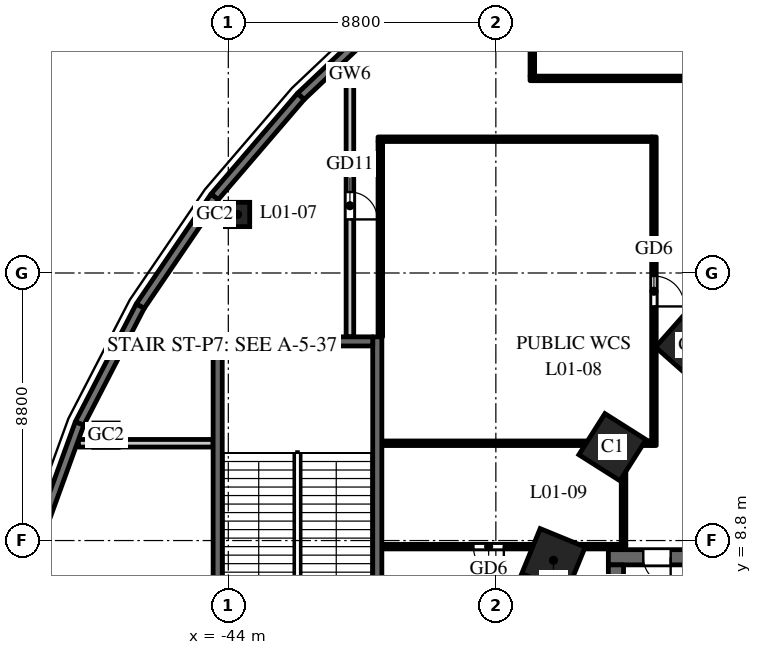
"""IFC4 building model, lengths in metres.
Left out: names, types, materials, properties, quantities, classifications, styles, units other than length and angle.
Written with IfcOpenShell. Run it as: python <this file> out.ifc"""

import sys

from ifc_helpers import new_model, si_unit, direction, frame, frame_2d, origin, origin_2d, place, context, subcontext, project, spatial, rectangle, hollow_rectangle, extrude, element, fill, save


model = new_model("IFC4")
c1 = context("Model", 3, precision=1e-05, world=origin(), true_north=direction((0.0, 1.0)))
c2 = subcontext(c1, "Body", "Model", "MODEL_VIEW")
j1 = project(units=[si_unit("LENGTHUNIT", "METRE"), si_unit("PLANEANGLEUNIT", "RADIAN")], contexts=[c1])
p1 = place(None, origin())
s1 = spatial("IfcSite", under=j1, at=p1, CompositionType="ELEMENT")
p2 = place(p1, origin())
s2 = spatial("IfcBuilding", under=s1, at=p2, CompositionType="ELEMENT")
p3 = place(p2, frame((0.0, 0.0, 7.5)))
s3 = spatial("IfcBuildingStorey", under=s2, at=p3, CompositionType="ELEMENT", Elevation=7.5)
for number, where, z_axis, x_axis in (
    (1, (-28.819, 15.23, 0.0), (0.0, 0.0, 1.0), (-0.663, -0.749, 0.0)),
    (2, (-31.365, 11.871, 0.0), (0.0, 0.0, 1.0), (-0.535, -0.845, 0.0)),
    (3, (-33.305, 8.149, 0.0), (0.0, 0.0, 1.0), (-0.379, -0.925, 0.0)),
):
    element("IfcColumn", number, at=place(p3, frame(where, z_axis=z_axis, x_axis=x_axis)), inside=s3, PredefinedType="COLUMN", context=c2, shape_type="SweptSolid", body=[
        extrude(rectangle(XDim=1.6, YDim=1.6, at=origin_2d()), origin(), (0.0, 0.0, 1.0), 6.0),
    ])
p4 = place(p3, frame((-16.5, 8.25, 0.0), z_axis=(0.0, 0.0, 1.0), x_axis=(-1.0, 0.0, 0.0)))
e4 = element("IfcWall", 4, at=p4, inside=s3, PredefinedType="SHEAR", context=c2, shape_type="SweptSolid", body=[
    extrude(rectangle(XDim=15.0, YDim=0.5, at=frame_2d((7.5, 0.0))), origin(), (0.0, 0.0, 1.0), 5.75),
])
p5 = place(p4, frame((6.9, 0.0, 0.0)))
e5 = element("IfcOpeningElement", 5, at=p5, cuts=e4, PredefinedType="OPENING", context=c2, shape_type="SweptSolid", body=[
    extrude(rectangle(XDim=1.2, YDim=2.1, at=frame_2d((0.6, 1.05))), frame((0.0, 0.26, 0.0), z_axis=(0.0, -1.0, 0.0), x_axis=(1.0, 0.0, 0.0)), (0.0, 0.0, 1.0), 0.52),
])
p6 = place(p4, frame((12.95, 0.0, 0.0)))
e6 = element("IfcOpeningElement", 6, at=p6, cuts=e4, PredefinedType="OPENING", context=c2, shape_type="SweptSolid", body=[
    extrude(rectangle(XDim=0.9, YDim=2.1, at=frame_2d((0.45, 1.05))), frame((0.0, 0.26, 0.0), z_axis=(0.0, -1.0, 0.0), x_axis=(1.0, 0.0, 0.0)), (0.0, 0.0, 1.0), 0.52),
])
p7 = place(p3, frame((-31.25, -8.0, 0.0), z_axis=(0.0, 0.0, 1.0), x_axis=(0.0, 1.0, 0.0)))
e7 = element("IfcWall", 7, at=p7, inside=s3, PredefinedType="SHEAR", context=c2, shape_type="SweptSolid", body=[
    extrude(rectangle(XDim=16.0, YDim=0.5, at=frame_2d((8.0, 0.0))), origin(), (0.0, 0.0, 1.0), 5.75),
])
for number, where, z_axis, x_axis in (
    (8, (-43.696, 19.525, 0.0), (0.0, 0.0, 1.0), (1.0, 0.0, 0.0)),
    (9, (-48.022, 12.267, 0.0), (0.0, 0.0, 1.0), (1.0, 0.0, 0.0)),
):
    element("IfcColumn", number, at=place(p3, frame(where, z_axis=z_axis, x_axis=x_axis)), inside=s3, PredefinedType="COLUMN", context=c2, shape_type="SweptSolid", body=[
        extrude(hollow_rectangle(XDim=0.8, YDim=0.8, WallThickness=0.04, at=origin_2d()), origin(), (0.0, 0.0, 1.0), 6.0),
    ])
p8 = place(p3, frame((-34.0, 24.075, 0.0), z_axis=(0.0, 0.0, 1.0), x_axis=(0.0, 1.0, 0.0)))
e10 = element("IfcWall", 10, at=p8, inside=s3, PredefinedType="PARTITIONING", context=c2, shape_type="SweptSolid", body=[
    extrude(rectangle(XDim=5.445, YDim=0.15, at=frame_2d((2.722, 0.0))), origin(), (0.0, 0.0, 1.0), 5.15),
])
p9 = place(p3, frame((8.075, 24.0, 0.0), z_axis=(0.0, 0.0, 1.0), x_axis=(-1.0, 0.0, 0.0)))
e11 = element("IfcWall", 11, at=p9, inside=s3, PredefinedType="PARTITIONING", context=c2, shape_type="SweptSolid", body=[
    extrude(rectangle(XDim=42.15, YDim=0.15, at=frame_2d((21.075, 0.0))), origin(), (0.0, 0.0, 1.0), 4.75),
])
p10 = place(p9, frame((19.875, 0.0, 0.0)))
e12 = element("IfcOpeningElement", 12, at=p10, cuts=e11, PredefinedType="OPENING", context=c2, shape_type="SweptSolid", body=[
    extrude(rectangle(XDim=1.4, YDim=2.1, at=frame_2d((0.7, 1.05))), frame((0.0, 0.085, 0.0), z_axis=(0.0, -1.0, 0.0), x_axis=(1.0, 0.0, 0.0)), (0.0, 0.0, 1.0), 0.17),
])
p11 = place(p3, frame((-44.5, 12.0, 0.0), z_axis=(0.0, 0.0, 1.0), x_axis=(-1.0, 0.0, 0.0)))
e13 = element("IfcWall", 13, at=p11, inside=s3, PredefinedType="PARTITIONING", context=c2, shape_type="SweptSolid", body=[
    extrude(rectangle(XDim=4.43, YDim=0.25, at=frame_2d((2.215, 0.0))), origin(), (0.0, 0.0, 1.0), 5.15),
])
p12 = place(p3, frame((-40.646, 24.0, 0.0), z_axis=(0.0, 0.0, 1.0), x_axis=(1.0, 0.0, 0.0)))
e14 = element("IfcWall", 14, at=p12, inside=s3, PredefinedType="PARTITIONING", context=c2, shape_type="SweptSolid", body=[
    extrude(rectangle(XDim=0.521, YDim=0.25, at=frame_2d((0.26, 0.0))), origin(), (0.0, 0.0, 1.0), 5.75),
])
p13 = place(p3, frame((-40.0, 24.125, 0.0), z_axis=(0.0, 0.0, 1.0), x_axis=(0.0, -1.0, 0.0)))
e15 = element("IfcWall", 15, at=p13, inside=s3, PredefinedType="PARTITIONING", context=c2, shape_type="SweptSolid", body=[
    extrude(rectangle(XDim=8.625, YDim=0.25, at=frame_2d((4.312, 0.0))), origin(), (0.0, 0.0, 1.0), 4.75),
])
p14 = place(p13, frame((3.863, 0.0, 0.0)))
e16 = element("IfcOpeningElement", 16, at=p14, cuts=e15, PredefinedType="OPENING", context=c2, shape_type="SweptSolid", body=[
    extrude(rectangle(XDim=0.9, YDim=2.1, at=frame_2d((0.45, 1.05))), frame((0.0, 0.135, 0.0), z_axis=(0.0, -1.0, 0.0), x_axis=(1.0, 0.0, 0.0)), (0.0, 0.0, 1.0), 0.27),
])
p15 = place(p3, frame((-31.065, 12.0, 0.0), z_axis=(0.0, 0.0, 1.0), x_axis=(-1.0, 0.0, 0.0)))
e17 = element("IfcWall", 17, at=p15, inside=s3, PredefinedType="PARTITIONING", context=c2, shape_type="SweptSolid", body=[
    extrude(rectangle(XDim=7.885, YDim=0.15, at=frame_2d((3.942, 0.0))), origin(), (0.0, 0.0, 1.0), 5.75),
])
p16 = place(p3, frame((-30.0, 22.075, 0.0), z_axis=(0.0, 0.0, 1.0), x_axis=(0.0, -1.0, 0.0)))
e18 = element("IfcWall", 18, at=p16, inside=s3, PredefinedType="PARTITIONING", context=c2, shape_type="SweptSolid", body=[
    extrude(rectangle(XDim=10.15, YDim=0.15, at=frame_2d((5.075, 0.0))), origin(), (0.0, 0.0, 1.0), 4.75),
])
p17 = place(p16, frame((4.575, 0.0, 0.0)))
e19 = element("IfcOpeningElement", 19, at=p17, cuts=e18, PredefinedType="OPENING", context=c2, shape_type="SweptSolid", body=[
    extrude(rectangle(XDim=1.0, YDim=2.1, at=frame_2d((0.5, 1.05))), frame((0.0, 0.085, 0.0), z_axis=(0.0, -1.0, 0.0), x_axis=(1.0, 0.0, 0.0)), (0.0, 0.0, 1.0), 0.17),
])
p18 = place(p3, frame((-30.075, 12.0, 0.0), z_axis=(0.0, 0.0, 1.0), x_axis=(-1.0, 0.0, 0.0)))
e20 = element("IfcWall", 20, at=p18, inside=s3, PredefinedType="PARTITIONING", context=c2, shape_type="SweptSolid", body=[
    extrude(rectangle(XDim=0.86, YDim=0.15, at=frame_2d((0.43, 0.0))), origin(), (0.0, 0.0, 1.0), 5.75),
])
p19 = place(p3, frame((-39.0, 15.5, 0.0), z_axis=(0.0, 0.0, 1.0), x_axis=(0.0, 1.0, 0.0)))
e21 = element("IfcWall", 21, at=p19, inside=s3, PredefinedType="PARTITIONING", context=c2, shape_type="SweptSolid", body=[
    extrude(rectangle(XDim=6.425, YDim=0.15, at=frame_2d((3.212, 0.0))), origin(), (0.0, 0.0, 1.0), 4.75),
])
p20 = place(p3, frame((-39.075, 22.0, 0.0), z_axis=(0.0, 0.0, 1.0), x_axis=(1.0, 0.0, 0.0)))
e22 = element("IfcWall", 22, at=p20, inside=s3, PredefinedType="PARTITIONING", context=c2, shape_type="SweptSolid", body=[
    extrude(rectangle(XDim=9.0, YDim=0.15, at=frame_2d((4.5, 0.0))), origin(), (0.0, 0.0, 1.0), 4.75),
])
p21 = place(p3, frame((-30.925, 8.6, 0.0), z_axis=(0.0, 0.0, 1.0), x_axis=(-1.0, 0.0, 0.0)))
e23 = element("IfcWall", 23, at=p21, inside=s3, PredefinedType="PARTITIONING", context=c2, shape_type="SweptSolid", body=[
    extrude(rectangle(XDim=8.025, YDim=0.15, at=frame_2d((4.012, 0.0))), origin(), (0.0, 0.0, 1.0), 4.85),
])
p22 = place(p21, frame((4.012, 0.0, 0.0)))
e24 = element("IfcOpeningElement", 24, at=p22, cuts=e23, PredefinedType="OPENING", context=c2, shape_type="SweptSolid", body=[
    extrude(rectangle(XDim=1.0, YDim=2.1, at=frame_2d((0.5, 1.05))), frame((0.0, 0.085, 0.0), z_axis=(0.0, -1.0, 0.0), x_axis=(1.0, 0.0, 0.0)), (0.0, 0.0, 1.0), 0.17),
])
p23 = place(p3, frame((-31.0, 11.925, 0.0), z_axis=(0.0, 0.0, 1.0), x_axis=(0.0, -1.0, 0.0)))
e25 = element("IfcWall", 25, at=p23, inside=s3, PredefinedType="PARTITIONING", context=c2, shape_type="SweptSolid", body=[
    extrude(rectangle(XDim=3.25, YDim=0.15, at=frame_2d((1.625, 0.0))), origin(), (0.0, 0.0, 1.0), 5.75),
])
p24 = place(p3, frame((-38.453, 26.401, 0.0), z_axis=(0.0, 0.0, 1.0), x_axis=(-0.72620446032, -0.687478786444, 0.0)))
e26 = element("IfcWall", 26, at=p24, inside=s3, PredefinedType="SOLIDWALL", context=c2, shape_type="SweptSolid", body=[
    extrude(rectangle(XDim=4.356, YDim=0.3, at=frame_2d((2.178, 0.0))), origin(), (0.0, 0.0, 1.0), 5.75),
])
p25 = place(p24, frame((0.608, 0.0, 1.0)))
e27 = element("IfcOpeningElement", 27, at=p25, cuts=e26, PredefinedType="OPENING", context=c2, shape_type="SweptSolid", body=[
    extrude(rectangle(XDim=2.4, YDim=3.0, at=frame_2d((1.2, 1.5))), frame((0.0, 0.16, 0.0), z_axis=(0.0, -1.0, 0.0), x_axis=(1.0, 0.0, 0.0)), (0.0, 0.0, 1.0), 0.32),
])
p26 = place(p3, frame((-41.617, 23.406, 0.0), z_axis=(0.0, 0.0, 1.0), x_axis=(-0.651387059497, -0.758745608699, 0.0)))
e28 = element("IfcWall", 28, at=p26, inside=s3, PredefinedType="SOLIDWALL", context=c2, shape_type="SweptSolid", body=[
    extrude(rectangle(XDim=4.353, YDim=0.3, at=frame_2d((2.176, 0.0))), origin(), (0.0, 0.0, 1.0), 5.75),
])
p27 = place(p26, frame((0.976, 0.0, 1.0)))
e29 = element("IfcOpeningElement", 29, at=p27, cuts=e28, PredefinedType="OPENING", context=c2, shape_type="SweptSolid", body=[
    extrude(rectangle(XDim=2.4, YDim=3.0, at=frame_2d((1.2, 1.5))), frame((0.0, 0.16, 0.0), z_axis=(0.0, -1.0, 0.0), x_axis=(1.0, 0.0, 0.0)), (0.0, 0.0, 1.0), 0.32),
])
p28 = place(p3, frame((-44.452, 20.104, 0.0), z_axis=(0.0, 0.0, 1.0), x_axis=(-0.562667738859, -0.82668314102, 0.0)))
e30 = element("IfcWall", 30, at=p28, inside=s3, PredefinedType="SOLIDWALL", context=c2, shape_type="SweptSolid", body=[
    extrude(rectangle(XDim=4.349, YDim=0.3, at=frame_2d((2.174, 0.0))), origin(), (0.0, 0.0, 1.0), 5.75),
])
p29 = place(p28, frame((0.974, 0.0, 1.0)))
e31 = element("IfcOpeningElement", 31, at=p29, cuts=e30, PredefinedType="OPENING", context=c2, shape_type="SweptSolid", body=[
    extrude(rectangle(XDim=2.4, YDim=3.0, at=frame_2d((1.2, 1.5))), frame((0.0, 0.16, 0.0), z_axis=(0.0, -1.0, 0.0), x_axis=(1.0, 0.0, 0.0)), (0.0, 0.0, 1.0), 0.32),
])
p30 = place(p3, frame((-46.899, 16.508, 0.0), z_axis=(0.0, 0.0, 1.0), x_axis=(-0.459242531468, -0.888310923771, 0.0)))
e32 = element("IfcWall", 32, at=p30, inside=s3, PredefinedType="SOLIDWALL", context=c2, shape_type="SweptSolid", body=[
    extrude(rectangle(XDim=4.345, YDim=0.3, at=frame_2d((2.172, 0.0))), origin(), (0.0, 0.0, 1.0), 5.75),
])
p31 = place(p30, frame((0.972, 0.0, 1.0)))
e33 = element("IfcOpeningElement", 33, at=p31, cuts=e32, PredefinedType="OPENING", context=c2, shape_type="SweptSolid", body=[
    extrude(rectangle(XDim=2.4, YDim=3.0, at=frame_2d((1.2, 1.5))), frame((0.0, 0.16, 0.0), z_axis=(0.0, -1.0, 0.0), x_axis=(1.0, 0.0, 0.0)), (0.0, 0.0, 1.0), 0.32),
])
p32 = place(p3, frame((-48.894, 12.649, 0.0), z_axis=(0.0, 0.0, 1.0), x_axis=(-0.341286990045, -0.939959142956, 0.0)))
e34 = element("IfcWall", 34, at=p32, inside=s3, PredefinedType="SOLIDWALL", context=c2, shape_type="SweptSolid", body=[
    extrude(rectangle(XDim=4.342, YDim=0.3, at=frame_2d((2.171, 0.0))), origin(), (0.0, 0.0, 1.0), 5.75),
])
p33 = place(p32, frame((0.971, 0.0, 1.0)))
e35 = element("IfcOpeningElement", 35, at=p33, cuts=e34, PredefinedType="OPENING", context=c2, shape_type="SweptSolid", body=[
    extrude(rectangle(XDim=2.4, YDim=3.0, at=frame_2d((1.2, 1.5))), frame((0.0, 0.16, 0.0), z_axis=(0.0, -1.0, 0.0), x_axis=(1.0, 0.0, 0.0)), (0.0, 0.0, 1.0), 0.32),
])
for number, where, z_axis, x_axis in (
    (36, (-44.35, 4.5, 0.0), (0.0, 0.0, 1.0), (0.0, 1.0, 0.0)),
    (37, (-39.1, 4.5, 0.0), (0.0, 0.0, 1.0), (0.0, 1.0, 0.0)),
):
    element("IfcWall", number, at=place(p3, frame(where, z_axis=z_axis, x_axis=x_axis)), inside=s3, PredefinedType="SHEAR", context=c2, shape_type="SweptSolid", body=[
        extrude(rectangle(XDim=11.0, YDim=0.3, at=frame_2d((5.5, 0.0))), origin(), (0.0, 0.0, 1.0), 5.75),
    ])
p34 = place(p3, frame((-44.2, 15.35, 0.0), z_axis=(0.0, 0.0, 1.0), x_axis=(1.0, 0.0, 0.0)))
e38 = element("IfcWall", 38, at=p34, inside=s3, PredefinedType="SHEAR", context=c2, shape_type="SweptSolid", body=[
    extrude(rectangle(XDim=4.95, YDim=0.3, at=frame_2d((2.475, 0.0))), origin(), (0.0, 0.0, 1.0), 5.75),
])
p35 = place(p6, origin())
e39 = element("IfcDoor", 39, at=p35, inside=s3, OperationType="SINGLE_SWING_RIGHT", PredefinedType="DOOR", context=c2, shape_type="SweptSolid", body=[
    extrude(rectangle(XDim=0.9, YDim=2.1, at=frame_2d((0.45, 1.05))), frame((0.0, 0.025, 0.0), z_axis=(0.0, -1.0, 0.0), x_axis=(1.0, 0.0, 0.0)), (0.0, 0.0, 1.0), 0.05),
])
fill(e6, e39)
p36 = place(p14, origin())
e40 = element("IfcDoor", 40, at=p36, inside=s3, OperationType="SINGLE_SWING_RIGHT", PredefinedType="DOOR", context=c2, shape_type="SweptSolid", body=[
    extrude(rectangle(XDim=0.9, YDim=2.1, at=frame_2d((0.45, 1.05))), frame((0.0, 0.025, 0.0), z_axis=(0.0, -1.0, 0.0), x_axis=(1.0, 0.0, 0.0)), (0.0, 0.0, 1.0), 0.05),
])
fill(e16, e40)
p37 = place(p17, origin())
e41 = element("IfcDoor", 41, at=p37, inside=s3, OperationType="SINGLE_SWING_RIGHT", PredefinedType="DOOR", context=c2, shape_type="SweptSolid", body=[
    extrude(rectangle(XDim=1.0, YDim=2.1, at=frame_2d((0.5, 1.05))), frame((0.0, 0.025, 0.0), z_axis=(0.0, -1.0, 0.0), x_axis=(1.0, 0.0, 0.0)), (0.0, 0.0, 1.0), 0.05),
])
fill(e19, e41)
p38 = place(p22, origin())
e42 = element("IfcDoor", 42, at=p38, inside=s3, OperationType="SINGLE_SWING_LEFT", PredefinedType="DOOR", context=c2, shape_type="SweptSolid", body=[
    extrude(rectangle(XDim=1.0, YDim=2.1, at=frame_2d((0.5, 1.05))), frame((0.0, 0.025, 0.0), z_axis=(0.0, -1.0, 0.0), x_axis=(1.0, 0.0, 0.0)), (0.0, 0.0, 1.0), 0.05),
])
fill(e24, e42)
p39 = place(p25, origin())
e43 = element("IfcWindow", 43, at=p39, inside=s3, PartitioningType="SINGLE_PANEL", PredefinedType="WINDOW", context=c2, shape_type="SweptSolid", body=[
    extrude(rectangle(XDim=2.4, YDim=3.0, at=frame_2d((1.2, 1.5))), frame((0.0, 0.03, 0.0), z_axis=(0.0, -1.0, 0.0), x_axis=(1.0, 0.0, 0.0)), (0.0, 0.0, 1.0), 0.06),
])
fill(e27, e43)
p40 = place(p27, origin())
e44 = element("IfcWindow", 44, at=p40, inside=s3, PartitioningType="SINGLE_PANEL", PredefinedType="WINDOW", context=c2, shape_type="SweptSolid", body=[
    extrude(rectangle(XDim=2.4, YDim=3.0, at=frame_2d((1.2, 1.5))), frame((0.0, 0.03, 0.0), z_axis=(0.0, -1.0, 0.0), x_axis=(1.0, 0.0, 0.0)), (0.0, 0.0, 1.0), 0.06),
])
fill(e29, e44)
p41 = place(p29, origin())
e45 = element("IfcWindow", 45, at=p41, inside=s3, PartitioningType="SINGLE_PANEL", PredefinedType="WINDOW", context=c2, shape_type="SweptSolid", body=[
    extrude(rectangle(XDim=2.4, YDim=3.0, at=frame_2d((1.2, 1.5))), frame((0.0, 0.03, 0.0), z_axis=(0.0, -1.0, 0.0), x_axis=(1.0, 0.0, 0.0)), (0.0, 0.0, 1.0), 0.06),
])
fill(e31, e45)
p42 = place(p31, origin())
e46 = element("IfcWindow", 46, at=p42, inside=s3, PartitioningType="SINGLE_PANEL", PredefinedType="WINDOW", context=c2, shape_type="SweptSolid", body=[
    extrude(rectangle(XDim=2.4, YDim=3.0, at=frame_2d((1.2, 1.5))), frame((0.0, 0.03, 0.0), z_axis=(0.0, -1.0, 0.0), x_axis=(1.0, 0.0, 0.0)), (0.0, 0.0, 1.0), 0.06),
])
fill(e33, e46)
p43 = place(p33, origin())
e47 = element("IfcWindow", 47, at=p43, inside=s3, PartitioningType="SINGLE_PANEL", PredefinedType="WINDOW", context=c2, shape_type="SweptSolid", body=[
    extrude(rectangle(XDim=2.4, YDim=3.0, at=frame_2d((1.2, 1.5))), frame((0.0, 0.03, 0.0), z_axis=(0.0, -1.0, 0.0), x_axis=(1.0, 0.0, 0.0)), (0.0, 0.0, 1.0), 0.06),
])
fill(e35, e47)
save(model, sys.argv[1])
